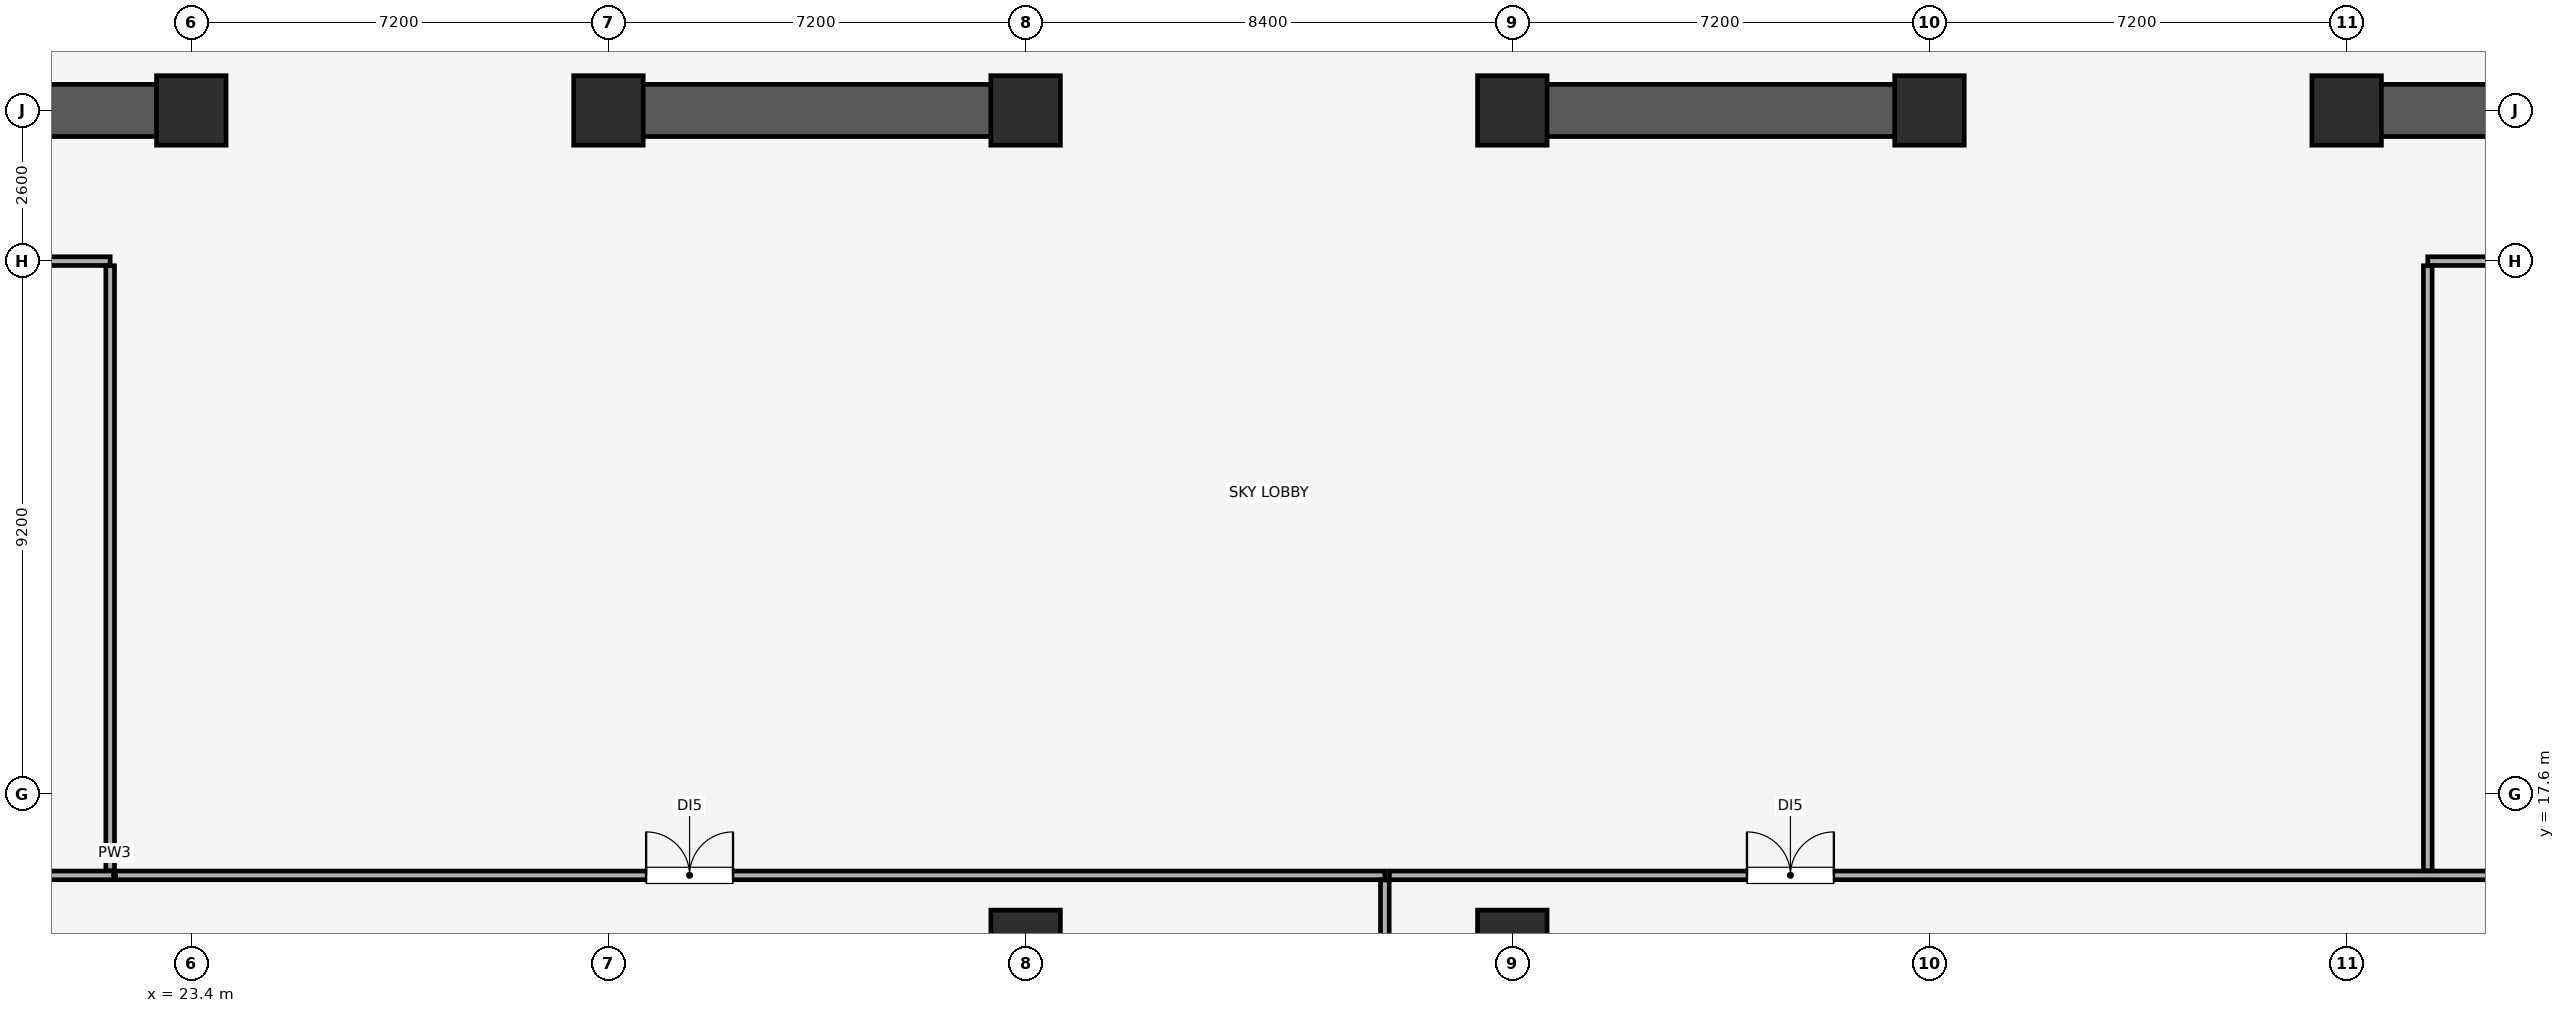
"""IFC4 building model, lengths in metres.
Left out: names, types, materials, properties, quantities, classifications, styles, units other than length and angle.
Written with IfcOpenShell. Run it as: python <this file> out.ifc"""

import sys

from ifc_helpers import new_model, si_unit, direction, frame, frame_2d, origin, origin_2d, place, context, subcontext, project, spatial, rectangle, extrude, element, fill, save


model = new_model("IFC4")
c1 = context("Model", 3, precision=1e-05, world=origin(), true_north=direction((0.0, 1.0)))
c2 = subcontext(c1, "Body", "Model", "MODEL_VIEW")
j1 = project(units=[si_unit("LENGTHUNIT", "METRE"), si_unit("PLANEANGLEUNIT", "RADIAN")], contexts=[c1])
p1 = place(None, origin())
s1 = spatial("IfcSite", under=j1, at=p1, CompositionType="ELEMENT")
p2 = place(p1, origin())
s2 = spatial("IfcBuilding", under=s1, at=p2, CompositionType="ELEMENT")
p3 = place(p2, frame((0.0, 0.0, 130.55)))
s3 = spatial("IfcBuildingStorey", under=s2, at=p3, CompositionType="ELEMENT", Elevation=130.55)
for number, where, z_axis, x_axis in (
    (1, (37.8, 15.0, 0.0), (0.0, 0.0, 1.0), (1.0, 0.0, 0.0)),
    (2, (46.2, 15.0, 0.0), (0.0, 0.0, 1.0), (1.0, 0.0, 0.0)),
    (3, (23.4, 29.4, 0.0), (0.0, 0.0, 1.0), (1.0, 0.0, 0.0)),
    (4, (30.6, 29.4, 0.0), (0.0, 0.0, 1.0), (1.0, 0.0, 0.0)),
    (5, (37.8, 29.4, 0.0), (0.0, 0.0, 1.0), (1.0, 0.0, 0.0)),
    (6, (46.2, 29.4, 0.0), (0.0, 0.0, 1.0), (1.0, 0.0, 0.0)),
    (7, (53.4, 29.4, 0.0), (0.0, 0.0, 1.0), (1.0, 0.0, 0.0)),
    (8, (60.6, 29.4, 0.0), (0.0, 0.0, 1.0), (1.0, 0.0, 0.0)),
):
    element("IfcColumn", number, at=place(p3, frame(where, z_axis=z_axis, x_axis=x_axis)), inside=s3, PredefinedType="COLUMN", context=c2, shape_type="SweptSolid", body=[
        extrude(rectangle(XDim=1.2, YDim=1.2, at=origin_2d()), origin(), (0.0, 0.0, 1.0), 4.56),
    ])
p4 = place(p3, frame((16.655, 29.4, 0.0), z_axis=(0.0, 0.0, 1.0), x_axis=(1.0, 0.0, 0.0)))
e9 = element("IfcWall", 9, at=p4, inside=s3, PredefinedType="SHEAR", context=c2, shape_type="SweptSolid", body=[
    extrude(rectangle(XDim=6.945, YDim=0.9, at=frame_2d((3.473, 0.0))), origin(), (0.0, 0.0, 1.0), 4.52),
])
for number, where, z_axis, x_axis in (
    (10, (30.4, 29.4, 0.0), (0.0, 0.0, 1.0), (1.0, 0.0, 0.0)),
    (11, (46.0, 29.4, 0.0), (0.0, 0.0, 1.0), (1.0, 0.0, 0.0)),
):
    element("IfcWall", number, at=place(p3, frame(where, z_axis=z_axis, x_axis=x_axis)), inside=s3, PredefinedType="SHEAR", context=c2, shape_type="SweptSolid", body=[
        extrude(rectangle(XDim=7.6, YDim=0.9, at=frame_2d((3.8, 0.0))), origin(), (0.0, 0.0, 1.0), 4.52),
    ])
p5 = place(p3, frame((60.4, 29.4, 0.0), z_axis=(0.0, 0.0, 1.0), x_axis=(1.0, 0.0, 0.0)))
e12 = element("IfcWall", 12, at=p5, inside=s3, PredefinedType="SHEAR", context=c2, shape_type="SweptSolid", body=[
    extrude(rectangle(XDim=6.945, YDim=0.9, at=frame_2d((3.473, 0.0))), origin(), (0.0, 0.0, 1.0), 4.52),
])
p6 = place(p3, frame((0.15, 16.2, 0.0), z_axis=(0.0, 0.0, 1.0), x_axis=(1.0, 0.0, 0.0)))
e13 = element("IfcWall", 13, at=p6, inside=s3, PredefinedType="PARTITIONING", context=c2, shape_type="SweptSolid", body=[
    extrude(rectangle(XDim=43.85, YDim=0.15, at=frame_2d((21.925, 0.0))), origin(), (0.0, 0.0, 1.0), 4.52),
])
p7 = place(p6, frame((31.1, 0.0, 0.0)))
e14 = element("IfcOpeningElement", 14, at=p7, cuts=e13, PredefinedType="OPENING", context=c2, shape_type="SweptSolid", body=[
    extrude(rectangle(XDim=1.5, YDim=2.25, at=frame_2d((0.75, 1.125))), frame((0.0, 0.085, 0.0), z_axis=(0.0, -1.0, 0.0), x_axis=(1.0, 0.0, 0.0)), (0.0, 0.0, 1.0), 0.17),
])
p8 = place(p3, frame((44.0, 0.15, 0.0), z_axis=(0.0, 0.0, 1.0), x_axis=(0.0, 1.0, 0.0)))
e15 = element("IfcWall", 15, at=p8, inside=s3, PredefinedType="PARTITIONING", context=c2, shape_type="SweptSolid", body=[
    extrude(rectangle(XDim=15.97, YDim=0.15, at=frame_2d((7.985, 0.0))), origin(), (0.0, 0.0, 1.0), 4.52),
])
p9 = place(p3, frame((44.08, 16.2, 0.0), z_axis=(0.0, 0.0, 1.0), x_axis=(1.0, 0.0, 0.0)))
e16 = element("IfcWall", 16, at=p9, inside=s3, PredefinedType="PARTITIONING", context=c2, shape_type="SweptSolid", body=[
    extrude(rectangle(XDim=39.77, YDim=0.15, at=frame_2d((19.885, 0.0))), origin(), (0.0, 0.0, 1.0), 4.52),
])
p10 = place(p9, frame((6.17, 0.0, 0.0)))
e17 = element("IfcOpeningElement", 17, at=p10, cuts=e16, PredefinedType="OPENING", context=c2, shape_type="SweptSolid", body=[
    extrude(rectangle(XDim=1.5, YDim=2.25, at=frame_2d((0.75, 1.125))), frame((0.0, 0.085, 0.0), z_axis=(0.0, -1.0, 0.0), x_axis=(1.0, 0.0, 0.0)), (0.0, 0.0, 1.0), 0.17),
])
p11 = place(p3, frame((0.15, 26.8, 0.0), z_axis=(0.0, 0.0, 1.0), x_axis=(1.0, 0.0, 0.0)))
e18 = element("IfcWall", 18, at=p11, inside=s3, PredefinedType="PARTITIONING", context=c2, shape_type="SweptSolid", body=[
    extrude(rectangle(XDim=21.85, YDim=0.15, at=frame_2d((10.925, 0.0))), origin(), (0.0, 0.0, 1.0), 4.52),
])
p12 = place(p11, frame((17.6, 0.0, 0.0)))
e19 = element("IfcOpeningElement", 19, at=p12, cuts=e18, PredefinedType="OPENING", context=c2, shape_type="SweptSolid", body=[
    extrude(rectangle(XDim=1.5, YDim=2.25, at=frame_2d((0.75, 1.125))), frame((0.0, 0.085, 0.0), z_axis=(0.0, -1.0, 0.0), x_axis=(1.0, 0.0, 0.0)), (0.0, 0.0, 1.0), 0.17),
])
p13 = place(p3, frame((22.0, 16.28, 0.0), z_axis=(0.0, 0.0, 1.0), x_axis=(0.0, 1.0, 0.0)))
e20 = element("IfcWall", 20, at=p13, inside=s3, PredefinedType="PARTITIONING", context=c2, shape_type="SweptSolid", body=[
    extrude(rectangle(XDim=10.44, YDim=0.15, at=frame_2d((5.22, 0.0))), origin(), (0.0, 0.0, 1.0), 4.52),
])
p14 = place(p3, frame((62.0, 26.8, 0.0), z_axis=(0.0, 0.0, 1.0), x_axis=(1.0, 0.0, 0.0)))
e21 = element("IfcWall", 21, at=p14, inside=s3, PredefinedType="PARTITIONING", context=c2, shape_type="SweptSolid", body=[
    extrude(rectangle(XDim=21.85, YDim=0.15, at=frame_2d((10.925, 0.0))), origin(), (0.0, 0.0, 1.0), 4.52),
])
p15 = place(p14, frame((2.75, 0.0, 0.0)))
e22 = element("IfcOpeningElement", 22, at=p15, cuts=e21, PredefinedType="OPENING", context=c2, shape_type="SweptSolid", body=[
    extrude(rectangle(XDim=1.5, YDim=2.25, at=frame_2d((0.75, 1.125))), frame((0.0, 0.085, 0.0), z_axis=(0.0, -1.0, 0.0), x_axis=(1.0, 0.0, 0.0)), (0.0, 0.0, 1.0), 0.17),
])
p16 = place(p3, frame((62.0, 16.28, 0.0), z_axis=(0.0, 0.0, 1.0), x_axis=(0.0, 1.0, 0.0)))
e23 = element("IfcWall", 23, at=p16, inside=s3, PredefinedType="PARTITIONING", context=c2, shape_type="SweptSolid", body=[
    extrude(rectangle(XDim=10.44, YDim=0.15, at=frame_2d((5.22, 0.0))), origin(), (0.0, 0.0, 1.0), 4.52),
])
p17 = place(p7, origin())
e24 = element("IfcDoor", 24, at=p17, inside=s3, OperationType="DOUBLE_DOOR_SINGLE_SWING", PredefinedType="DOOR", context=c2, shape_type="SweptSolid", body=[
    extrude(rectangle(XDim=1.5, YDim=2.25, at=frame_2d((0.75, 1.125))), frame((0.0, 0.025, 0.0), z_axis=(0.0, -1.0, 0.0), x_axis=(1.0, 0.0, 0.0)), (0.0, 0.0, 1.0), 0.05),
])
fill(e14, e24)
p18 = place(p10, origin())
e25 = element("IfcDoor", 25, at=p18, inside=s3, OperationType="DOUBLE_DOOR_SINGLE_SWING", PredefinedType="DOOR", context=c2, shape_type="SweptSolid", body=[
    extrude(rectangle(XDim=1.5, YDim=2.25, at=frame_2d((0.75, 1.125))), frame((0.0, 0.025, 0.0), z_axis=(0.0, -1.0, 0.0), x_axis=(1.0, 0.0, 0.0)), (0.0, 0.0, 1.0), 0.05),
])
fill(e17, e25)
save(model, sys.argv[1])
